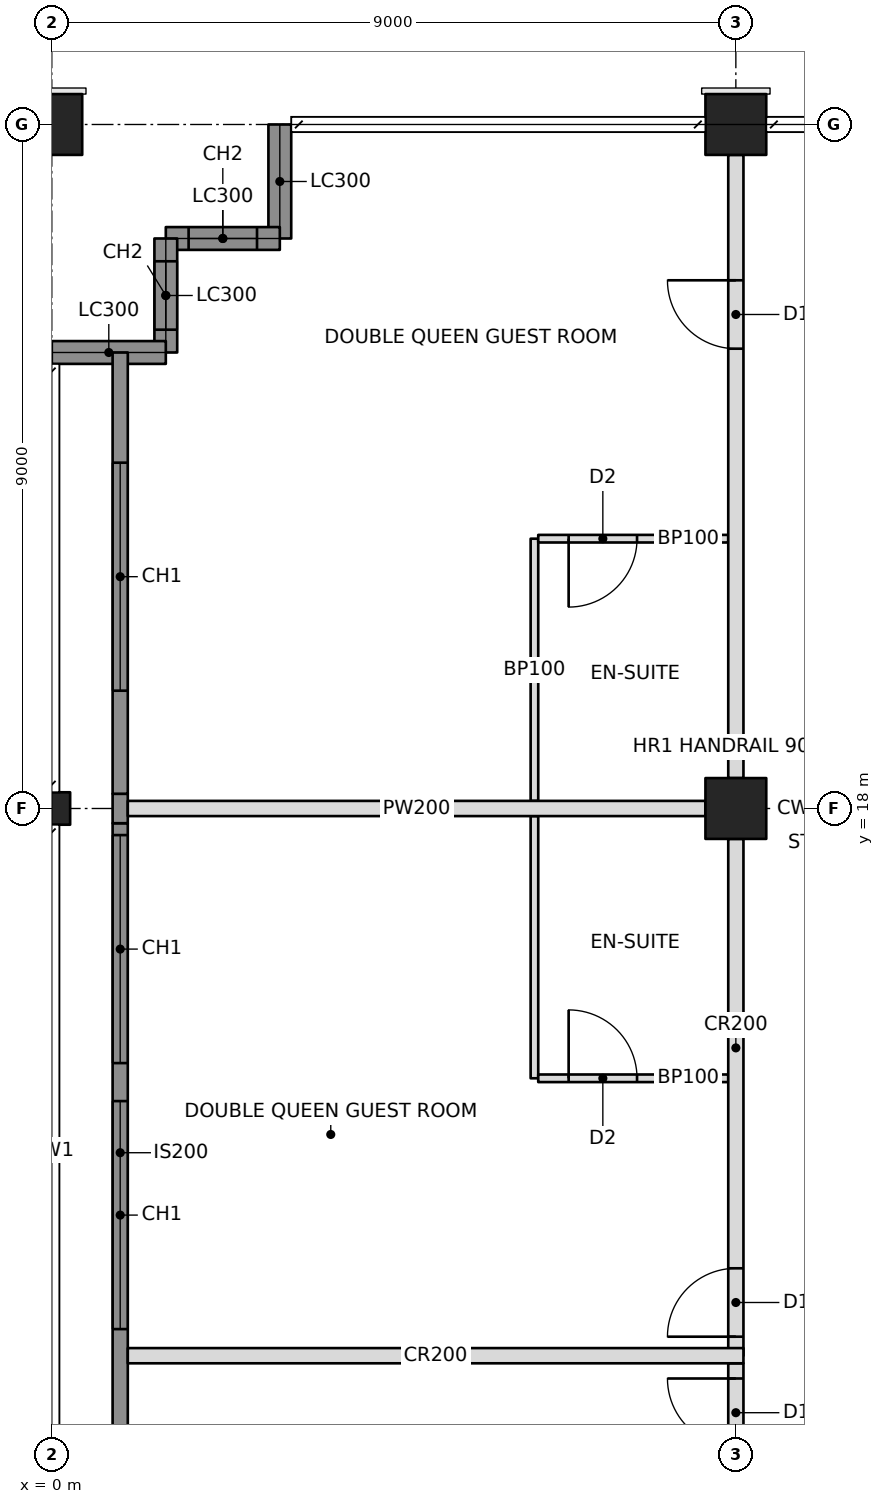
"""IFC4 building model, lengths in metres.
Left out: names, types, materials, properties, quantities, classifications, styles, units other than length and angle.
Written with IfcOpenShell. Run it as: python <this file> out.ifc"""

import sys

from ifc_helpers import new_model, si_unit, direction, frame, frame_2d, origin, origin_2d, place, context, subcontext, project, spatial, rectangle, hollow_rectangle, i_section, extrude, element, fill, save


model = new_model("IFC4")
c1 = context("Model", 3, precision=1e-05, world=origin(), true_north=direction((0.0, 1.0)))
c2 = subcontext(c1, "Body", "Model", "MODEL_VIEW")
j1 = project(units=[si_unit("LENGTHUNIT", "METRE"), si_unit("PLANEANGLEUNIT", "RADIAN")], contexts=[c1])
p1 = place(None, origin())
s1 = spatial("IfcSite", under=j1, at=p1, CompositionType="ELEMENT")
p2 = place(p1, origin())
s2 = spatial("IfcBuilding", under=s1, at=p2, CompositionType="ELEMENT")
p3 = place(p2, frame((0.0, 0.0, 201.2)))
s3 = spatial("IfcBuildingStorey", under=s2, at=p3, CompositionType="ELEMENT", Elevation=201.2)
p4 = place(p3, frame((0.0, 18.0, 0.0), z_axis=(0.0, 0.0, 1.0), x_axis=(0.0, 1.0, 0.0)))
e1 = element("IfcColumn", 1, at=p4, inside=s3, PredefinedType="COLUMN", context=c2, shape_type="SweptSolid", body=[
    extrude(i_section(OverallWidth=0.427, OverallDepth=0.483, WebThickness=0.051, FlangeThickness=0.082, at=origin_2d()), origin(), (0.0, 0.0, 1.0), 3.4),
])
p5 = place(p3, frame((0.0, 27.0, 0.0), z_axis=(0.0, 0.0, 1.0), x_axis=(0.0, 1.0, 0.0)))
e2 = element("IfcColumn", 2, at=p5, inside=s3, PredefinedType="COLUMN", context=c2, shape_type="SweptSolid", body=[
    extrude(hollow_rectangle(XDim=0.8, YDim=0.8, WallThickness=0.06, at=origin_2d()), origin(), (0.0, 0.0, 1.0), 3.4),
])
p6 = place(p3, frame((9.0, 18.0, 0.0), z_axis=(0.0, 0.0, 1.0), x_axis=(1.0, 0.0, 0.0)))
e3 = element("IfcColumn", 3, at=p6, inside=s3, PredefinedType="COLUMN", context=c2, shape_type="SweptSolid", body=[
    extrude(hollow_rectangle(XDim=0.8, YDim=0.8, WallThickness=0.05, at=origin_2d()), origin(), (0.0, 0.0, 1.0), 3.4),
])
p7 = place(p3, frame((9.0, 27.0, 0.0), z_axis=(0.0, 0.0, 1.0), x_axis=(1.0, 0.0, 0.0)))
e4 = element("IfcColumn", 4, at=p7, inside=s3, PredefinedType="COLUMN", context=c2, shape_type="SweptSolid", body=[
    extrude(hollow_rectangle(XDim=0.8, YDim=0.8, WallThickness=0.06, at=origin_2d()), origin(), (0.0, 0.0, 1.0), 3.4),
])
p8 = place(p3, frame((3.0, 27.0, 0.0), z_axis=(0.0, 0.0, 1.0), x_axis=(0.0, -1.0, 0.0)))
e5 = element("IfcWall", 5, at=p8, inside=s3, PredefinedType="SOLIDWALL", context=c2, shape_type="SweptSolid", body=[
    extrude(rectangle(XDim=1.5, YDim=0.3, at=frame_2d((0.75, 0.0))), origin(), (0.0, 0.0, 1.0), 2.42),
])
p9 = place(p3, frame((3.0, 25.5, 0.0), z_axis=(0.0, 0.0, 1.0), x_axis=(-1.0, 0.0, 0.0)))
e6 = element("IfcWall", 6, at=p9, inside=s3, PredefinedType="SOLIDWALL", context=c2, shape_type="SweptSolid", body=[
    extrude(rectangle(XDim=1.5, YDim=0.3, at=frame_2d((0.75, 0.0))), origin(), (0.0, 0.0, 1.0), 3.2),
])
p10 = place(p9, frame((0.3, 0.0, 0.6)))
e7 = element("IfcOpeningElement", 7, at=p10, cuts=e6, PredefinedType="OPENING", context=c2, shape_type="SweptSolid", body=[
    extrude(rectangle(XDim=0.9, YDim=2.2, at=frame_2d((0.45, 1.1))), frame((0.0, 0.16, 0.0), z_axis=(0.0, -1.0, 0.0), x_axis=(1.0, 0.0, 0.0)), (0.0, 0.0, 1.0), 0.32),
])
p11 = place(p3, frame((1.5, 25.5, 0.0), z_axis=(0.0, 0.0, 1.0), x_axis=(0.0, -1.0, 0.0)))
e8 = element("IfcWall", 8, at=p11, inside=s3, PredefinedType="SOLIDWALL", context=c2, shape_type="SweptSolid", body=[
    extrude(rectangle(XDim=1.5, YDim=0.3, at=frame_2d((0.75, 0.0))), origin(), (0.0, 0.0, 1.0), 3.2),
])
p12 = place(p11, frame((0.3, 0.0, 0.6)))
e9 = element("IfcOpeningElement", 9, at=p12, cuts=e8, PredefinedType="OPENING", context=c2, shape_type="SweptSolid", body=[
    extrude(rectangle(XDim=0.9, YDim=2.2, at=frame_2d((0.45, 1.1))), frame((0.0, 0.16, 0.0), z_axis=(0.0, -1.0, 0.0), x_axis=(1.0, 0.0, 0.0)), (0.0, 0.0, 1.0), 0.32),
])
p13 = place(p3, frame((1.5, 24.0, 0.0), z_axis=(0.0, 0.0, 1.0), x_axis=(-1.0, 0.0, 0.0)))
e10 = element("IfcWall", 10, at=p13, inside=s3, PredefinedType="SOLIDWALL", context=c2, shape_type="SweptSolid", body=[
    extrude(rectangle(XDim=1.5, YDim=0.3, at=frame_2d((0.75, 0.0))), origin(), (0.0, 0.0, 1.0), 2.42),
])
p14 = place(p3, frame((9.0, 10.8, 0.0), z_axis=(0.0, 0.0, 1.0), x_axis=(0.0, 1.0, 0.0)))
e11 = element("IfcWall", 11, at=p14, inside=s3, PredefinedType="PARTITIONING", context=c2, shape_type="SweptSolid", body=[
    extrude(rectangle(XDim=6.8, YDim=0.2, at=frame_2d((3.4, 0.0))), origin(), (0.0, 0.0, 1.0), 2.405),
])
p15 = place(p14, frame((0.25, 0.0, 0.0)))
e12 = element("IfcOpeningElement", 12, at=p15, cuts=e11, PredefinedType="OPENING", context=c2, shape_type="SweptSolid", body=[
    extrude(rectangle(XDim=0.9, YDim=2.1, at=frame_2d((0.45, 1.05))), frame((0.0, 0.11, 0.0), z_axis=(0.0, -1.0, 0.0), x_axis=(1.0, 0.0, 0.0)), (0.0, 0.0, 1.0), 0.22),
])
p16 = place(p3, frame((9.0, 18.4, 0.0), z_axis=(0.0, 0.0, 1.0), x_axis=(0.0, 1.0, 0.0)))
e13 = element("IfcWall", 13, at=p16, inside=s3, PredefinedType="PARTITIONING", context=c2, shape_type="SweptSolid", body=[
    extrude(rectangle(XDim=8.2, YDim=0.2, at=frame_2d((4.1, 0.0))), origin(), (0.0, 0.0, 1.0), 2.405),
])
p17 = place(p16, frame((5.65, 0.0, 0.0)))
e14 = element("IfcOpeningElement", 14, at=p17, cuts=e13, PredefinedType="OPENING", context=c2, shape_type="SweptSolid", body=[
    extrude(rectangle(XDim=0.9, YDim=2.1, at=frame_2d((0.45, 1.05))), frame((0.0, 0.11, 0.0), z_axis=(0.0, -1.0, 0.0), x_axis=(1.0, 0.0, 0.0)), (0.0, 0.0, 1.0), 0.22),
])
p18 = place(p3, frame((1.0, 10.8, 0.0), z_axis=(0.0, 0.0, 1.0), x_axis=(1.0, 0.0, 0.0)))
e15 = element("IfcWall", 15, at=p18, inside=s3, PredefinedType="PARTITIONING", context=c2, shape_type="SweptSolid", body=[
    extrude(rectangle(XDim=8.1, YDim=0.2, at=frame_2d((4.05, 0.0))), origin(), (0.0, 0.0, 1.0), 2.404),
])
p19 = place(p3, frame((8.6, 18.0, 0.0), z_axis=(0.0, 0.0, 1.0), x_axis=(-1.0, 0.0, 0.0)))
e16 = element("IfcWall", 16, at=p19, inside=s3, PredefinedType="PARTITIONING", context=c2, shape_type="SweptSolid", body=[
    extrude(rectangle(XDim=7.6, YDim=0.2, at=frame_2d((3.8, 0.0))), origin(), (0.0, 0.0, 1.0), 2.405),
])
p20 = place(p3, frame((6.35, 14.45, 0.0), z_axis=(0.0, 0.0, 1.0), x_axis=(0.0, 1.0, 0.0)))
e17 = element("IfcWall", 17, at=p20, inside=s3, PredefinedType="PARTITIONING", context=c2, shape_type="SweptSolid", body=[
    extrude(rectangle(XDim=3.45, YDim=0.1, at=frame_2d((1.725, 0.0))), origin(), (0.0, 0.0, 1.0), 2.404),
])
p21 = place(p3, frame((8.9, 14.45, 0.0), z_axis=(0.0, 0.0, 1.0), x_axis=(-1.0, 0.0, 0.0)))
e18 = element("IfcWall", 18, at=p21, inside=s3, PredefinedType="PARTITIONING", context=c2, shape_type="SweptSolid", body=[
    extrude(rectangle(XDim=2.5, YDim=0.1, at=frame_2d((1.25, 0.0))), origin(), (0.0, 0.0, 1.0), 2.404),
])
p22 = place(p21, frame((1.2, 0.0, 0.0)))
e19 = element("IfcOpeningElement", 19, at=p22, cuts=e18, PredefinedType="OPENING", context=c2, shape_type="SweptSolid", body=[
    extrude(rectangle(XDim=0.9, YDim=2.1, at=frame_2d((0.45, 1.05))), frame((0.0, 0.06, 0.0), z_axis=(0.0, -1.0, 0.0), x_axis=(1.0, 0.0, 0.0)), (0.0, 0.0, 1.0), 0.12),
])
p23 = place(p3, frame((6.35, 18.1, 0.0), z_axis=(0.0, 0.0, 1.0), x_axis=(0.0, 1.0, 0.0)))
e20 = element("IfcWall", 20, at=p23, inside=s3, PredefinedType="PARTITIONING", context=c2, shape_type="SweptSolid", body=[
    extrude(rectangle(XDim=3.45, YDim=0.1, at=frame_2d((1.725, 0.0))), origin(), (0.0, 0.0, 1.0), 2.404),
])
p24 = place(p3, frame((8.9, 21.55, 0.0), z_axis=(0.0, 0.0, 1.0), x_axis=(-1.0, 0.0, 0.0)))
e21 = element("IfcWall", 21, at=p24, inside=s3, PredefinedType="PARTITIONING", context=c2, shape_type="SweptSolid", body=[
    extrude(rectangle(XDim=2.5, YDim=0.1, at=frame_2d((1.25, 0.0))), origin(), (0.0, 0.0, 1.0), 2.404),
])
p25 = place(p24, frame((1.2, 0.0, 0.0)))
e22 = element("IfcOpeningElement", 22, at=p25, cuts=e21, PredefinedType="OPENING", context=c2, shape_type="SweptSolid", body=[
    extrude(rectangle(XDim=0.9, YDim=2.1, at=frame_2d((0.45, 1.05))), frame((0.0, 0.06, 0.0), z_axis=(0.0, -1.0, 0.0), x_axis=(1.0, 0.0, 0.0)), (0.0, 0.0, 1.0), 0.12),
])
p26 = place(p3, frame((9.0, 9.4, 0.0), z_axis=(0.0, 0.0, 1.0), x_axis=(0.0, 1.0, 0.0)))
e23 = element("IfcWall", 23, at=p26, inside=s3, PredefinedType="PARTITIONING", context=c2, shape_type="SweptSolid", body=[
    extrude(rectangle(XDim=1.3, YDim=0.2, at=frame_2d((0.65, 0.0))), origin(), (0.0, 0.0, 1.0), 2.405),
])
p27 = place(p26, frame((0.2, 0.0, 0.0)))
e24 = element("IfcOpeningElement", 24, at=p27, cuts=e23, PredefinedType="OPENING", context=c2, shape_type="SweptSolid", body=[
    extrude(rectangle(XDim=0.9, YDim=2.1, at=frame_2d((0.45, 1.05))), frame((0.0, 0.11, 0.0), z_axis=(0.0, -1.0, 0.0), x_axis=(1.0, 0.0, 0.0)), (0.0, 0.0, 1.0), 0.22),
])
p28 = place(p3, frame((0.9, 9.135, 0.0), z_axis=(0.0, 0.0, 1.0), x_axis=(0.0, 1.0, 0.0)))
e25 = element("IfcWall", 25, at=p28, inside=s3, PredefinedType="SOLIDWALL", context=c2, shape_type="SweptSolid", body=[
    extrude(rectangle(XDim=8.671, YDim=0.2, at=frame_2d((4.335, 0.0))), origin(), (0.0, 0.0, 1.0), 3.2),
])
p29 = place(p28, frame((2.015, 0.0, 0.6)))
e26 = element("IfcOpeningElement", 26, at=p29, cuts=e25, PredefinedType="OPENING", context=c2, shape_type="SweptSolid", body=[
    extrude(rectangle(XDim=3.0, YDim=2.2, at=frame_2d((1.5, 1.1))), frame((0.0, 0.11, 0.0), z_axis=(0.0, -1.0, 0.0), x_axis=(1.0, 0.0, 0.0)), (0.0, 0.0, 1.0), 0.22),
])
p30 = place(p28, frame((5.515, 0.0, 0.6)))
e27 = element("IfcOpeningElement", 27, at=p30, cuts=e25, PredefinedType="OPENING", context=c2, shape_type="SweptSolid", body=[
    extrude(rectangle(XDim=3.0, YDim=2.2, at=frame_2d((1.5, 1.1))), frame((0.0, 0.11, 0.0), z_axis=(0.0, -1.0, 0.0), x_axis=(1.0, 0.0, 0.0)), (0.0, 0.0, 1.0), 0.22),
])
p31 = place(p3, frame((0.9, 17.806, 0.0), z_axis=(0.0, 0.0, 1.0), x_axis=(0.0, 1.0, 0.0)))
e28 = element("IfcWall", 28, at=p31, inside=s3, PredefinedType="SOLIDWALL", context=c2, shape_type="SweptSolid", body=[
    extrude(rectangle(XDim=0.388, YDim=0.2, at=frame_2d((0.194, 0.0))), origin(), (0.0, 0.0, 1.0), 2.404),
])
p32 = place(p3, frame((0.9, 18.194, 0.0), z_axis=(0.0, 0.0, 1.0), x_axis=(0.0, 1.0, 0.0)))
e29 = element("IfcWall", 29, at=p32, inside=s3, PredefinedType="SOLIDWALL", context=c2, shape_type="SweptSolid", body=[
    extrude(rectangle(XDim=5.806, YDim=0.2, at=frame_2d((2.903, 0.0))), origin(), (0.0, 0.0, 1.0), 3.2),
])
p33 = place(p32, frame((1.356, 0.0, 0.6)))
e30 = element("IfcOpeningElement", 30, at=p33, cuts=e29, PredefinedType="OPENING", context=c2, shape_type="SweptSolid", body=[
    extrude(rectangle(XDim=3.0, YDim=2.2, at=frame_2d((1.5, 1.1))), frame((0.0, 0.11, 0.0), z_axis=(0.0, -1.0, 0.0), x_axis=(1.0, 0.0, 0.0)), (0.0, 0.0, 1.0), 0.22),
])
p34 = place(p10, origin())
e31 = element("IfcWindow", 31, at=p34, inside=s3, PartitioningType="SINGLE_PANEL", PredefinedType="WINDOW", context=c2, shape_type="SweptSolid", body=[
    extrude(rectangle(XDim=0.9, YDim=2.2, at=frame_2d((0.45, 1.1))), frame((0.0, 0.03, 0.0), z_axis=(0.0, -1.0, 0.0), x_axis=(1.0, 0.0, 0.0)), (0.0, 0.0, 1.0), 0.06),
])
fill(e7, e31)
p35 = place(p12, origin())
e32 = element("IfcWindow", 32, at=p35, inside=s3, PartitioningType="SINGLE_PANEL", PredefinedType="WINDOW", context=c2, shape_type="SweptSolid", body=[
    extrude(rectangle(XDim=0.9, YDim=2.2, at=frame_2d((0.45, 1.1))), frame((0.0, 0.03, 0.0), z_axis=(0.0, -1.0, 0.0), x_axis=(1.0, 0.0, 0.0)), (0.0, 0.0, 1.0), 0.06),
])
fill(e9, e32)
p36 = place(p29, origin())
e33 = element("IfcWindow", 33, at=p36, inside=s3, PartitioningType="TRIPLE_PANEL_VERTICAL", PredefinedType="WINDOW", context=c2, shape_type="SweptSolid", body=[
    extrude(rectangle(XDim=3.0, YDim=2.2, at=frame_2d((1.5, 1.1))), frame((0.0, 0.03, 0.0), z_axis=(0.0, -1.0, 0.0), x_axis=(1.0, 0.0, 0.0)), (0.0, 0.0, 1.0), 0.06),
])
fill(e26, e33)
p37 = place(p30, origin())
e34 = element("IfcWindow", 34, at=p37, inside=s3, PartitioningType="TRIPLE_PANEL_VERTICAL", PredefinedType="WINDOW", context=c2, shape_type="SweptSolid", body=[
    extrude(rectangle(XDim=3.0, YDim=2.2, at=frame_2d((1.5, 1.1))), frame((0.0, 0.03, 0.0), z_axis=(0.0, -1.0, 0.0), x_axis=(1.0, 0.0, 0.0)), (0.0, 0.0, 1.0), 0.06),
])
fill(e27, e34)
p38 = place(p33, origin())
e35 = element("IfcWindow", 35, at=p38, inside=s3, PartitioningType="TRIPLE_PANEL_VERTICAL", PredefinedType="WINDOW", context=c2, shape_type="SweptSolid", body=[
    extrude(rectangle(XDim=3.0, YDim=2.2, at=frame_2d((1.5, 1.1))), frame((0.0, 0.03, 0.0), z_axis=(0.0, -1.0, 0.0), x_axis=(1.0, 0.0, 0.0)), (0.0, 0.0, 1.0), 0.06),
])
fill(e30, e35)
p39 = place(p22, frame((0.9, 0.0, 0.0), z_axis=(0.0, 0.0, 1.0), x_axis=(-1.0, 0.0, 0.0)))
e36 = element("IfcDoor", 36, at=p39, inside=s3, OperationType="SINGLE_SWING_LEFT", PredefinedType="DOOR", context=c2, shape_type="SweptSolid", body=[
    extrude(rectangle(XDim=0.9, YDim=2.1, at=frame_2d((0.45, 1.05))), frame((0.0, 0.025, 0.0), z_axis=(0.0, -1.0, 0.0), x_axis=(1.0, 0.0, 0.0)), (0.0, 0.0, 1.0), 0.05),
])
fill(e19, e36)
p40 = place(p15, origin())
e37 = element("IfcDoor", 37, at=p40, inside=s3, OperationType="SINGLE_SWING_LEFT", PredefinedType="DOOR", context=c2, shape_type="SweptSolid", body=[
    extrude(rectangle(XDim=0.9, YDim=2.1, at=frame_2d((0.45, 1.05))), frame((0.0, 0.025, 0.0), z_axis=(0.0, -1.0, 0.0), x_axis=(1.0, 0.0, 0.0)), (0.0, 0.0, 1.0), 0.05),
])
fill(e12, e37)
p41 = place(p25, origin())
e38 = element("IfcDoor", 38, at=p41, inside=s3, OperationType="SINGLE_SWING_RIGHT", PredefinedType="DOOR", context=c2, shape_type="SweptSolid", body=[
    extrude(rectangle(XDim=0.9, YDim=2.1, at=frame_2d((0.45, 1.05))), frame((0.0, 0.025, 0.0), z_axis=(0.0, -1.0, 0.0), x_axis=(1.0, 0.0, 0.0)), (0.0, 0.0, 1.0), 0.05),
])
fill(e22, e38)
p42 = place(p17, origin())
e39 = element("IfcDoor", 39, at=p42, inside=s3, OperationType="SINGLE_SWING_RIGHT", PredefinedType="DOOR", context=c2, shape_type="SweptSolid", body=[
    extrude(rectangle(XDim=0.9, YDim=2.1, at=frame_2d((0.45, 1.05))), frame((0.0, 0.025, 0.0), z_axis=(0.0, -1.0, 0.0), x_axis=(1.0, 0.0, 0.0)), (0.0, 0.0, 1.0), 0.05),
])
fill(e14, e39)
p43 = place(p27, origin())
e40 = element("IfcDoor", 40, at=p43, inside=s3, OperationType="SINGLE_SWING_RIGHT", PredefinedType="DOOR", context=c2, shape_type="SweptSolid", body=[
    extrude(rectangle(XDim=0.9, YDim=2.1, at=frame_2d((0.45, 1.05))), frame((0.0, 0.025, 0.0), z_axis=(0.0, -1.0, 0.0), x_axis=(1.0, 0.0, 0.0)), (0.0, 0.0, 1.0), 0.05),
])
fill(e24, e40)
save(model, sys.argv[1])
